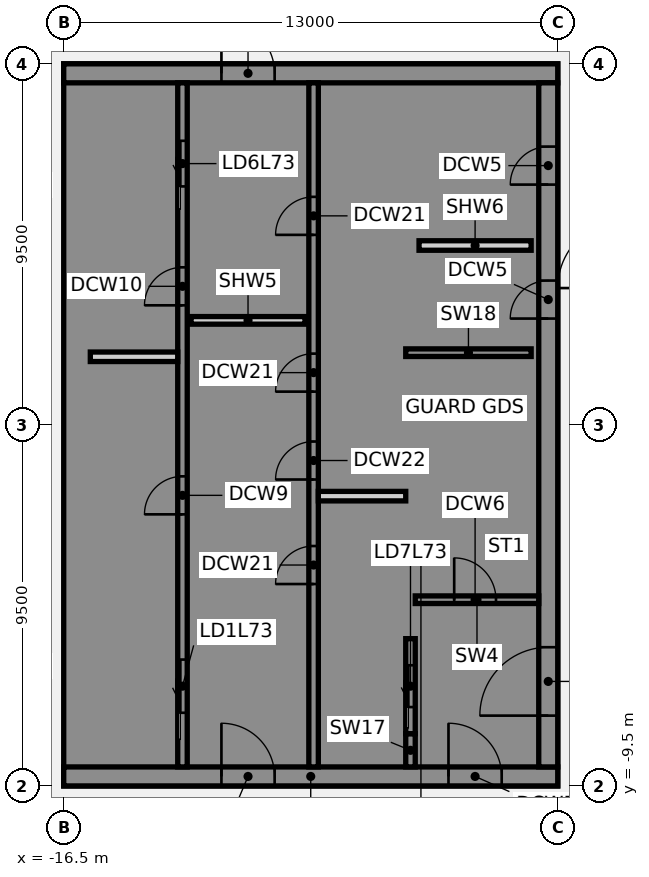
"""IFC4 building model, lengths in metres.
Left out: names, types, materials, properties, quantities, classifications, styles, units other than length and angle.
Written with IfcOpenShell. Run it as: python <this file> out.ifc"""

import sys

from ifc_helpers import new_model, si_unit, direction, frame, frame_2d, origin, place, context, subcontext, project, spatial, polyline, rectangle, outline, extrude, element, fill, save


model = new_model("IFC4")
c1 = context("Model", 3, precision=1e-05, world=origin(), true_north=direction((0.0, 1.0)))
c2 = subcontext(c1, "Body", "Model", "MODEL_VIEW")
j1 = project(units=[si_unit("LENGTHUNIT", "METRE"), si_unit("PLANEANGLEUNIT", "RADIAN")], contexts=[c1])
p1 = place(None, origin())
s1 = spatial("IfcSite", under=j1, at=p1, CompositionType="ELEMENT")
p2 = place(p1, origin())
s2 = spatial("IfcBuilding", under=s1, at=p2, CompositionType="ELEMENT")
p3 = place(p2, frame((0.0, 0.0, 294.4)))
s3 = spatial("IfcBuildingStorey", under=s2, at=p3, CompositionType="ELEMENT", Elevation=294.4)
p4 = place(p3, frame((-16.5, -9.25, 0.0), z_axis=(0.0, 0.0, 1.0), x_axis=(1.0, 0.0, 0.0)))
e1 = element("IfcWall", 1, at=p4, inside=s3, PredefinedType="SHEAR", context=c2, shape_type="SweptSolid", body=[
    extrude(rectangle(XDim=13.0, YDim=0.5, at=frame_2d((6.5, 0.0))), origin(), (0.0, 0.0, 1.0), 4.75),
])
p5 = place(p4, frame((4.15, 0.0, 0.0)))
e2 = element("IfcOpeningElement", 2, at=p5, cuts=e1, PredefinedType="OPENING", context=c2, shape_type="SweptSolid", body=[
    extrude(rectangle(XDim=1.4, YDim=2.1, at=frame_2d((0.7, 1.05))), frame((0.0, 0.26, 0.0), z_axis=(0.0, -1.0, 0.0), x_axis=(1.0, 0.0, 0.0)), (0.0, 0.0, 1.0), 0.52),
])
p6 = place(p4, frame((10.125, 0.0, 0.0)))
e3 = element("IfcOpeningElement", 3, at=p6, cuts=e1, PredefinedType="OPENING", context=c2, shape_type="SweptSolid", body=[
    extrude(rectangle(XDim=1.4, YDim=2.1, at=frame_2d((0.7, 1.05))), frame((0.0, 0.26, 0.0), z_axis=(0.0, -1.0, 0.0), x_axis=(1.0, 0.0, 0.0)), (0.0, 0.0, 1.0), 0.52),
])
p7 = place(p3, frame((-16.5, 9.25, 0.0), z_axis=(0.0, 0.0, 1.0), x_axis=(1.0, 0.0, 0.0)))
e4 = element("IfcWall", 4, at=p7, inside=s3, PredefinedType="SHEAR", context=c2, shape_type="SweptSolid", body=[
    extrude(rectangle(XDim=13.0, YDim=0.5, at=frame_2d((6.5, 0.0))), origin(), (0.0, 0.0, 1.0), 4.75),
])
p8 = place(p7, frame((4.15, 0.0, 0.0)))
e5 = element("IfcOpeningElement", 5, at=p8, cuts=e4, PredefinedType="OPENING", context=c2, shape_type="SweptSolid", body=[
    extrude(rectangle(XDim=1.4, YDim=2.1, at=frame_2d((0.7, 1.05))), frame((0.0, 0.26, 0.0), z_axis=(0.0, -1.0, 0.0), x_axis=(1.0, 0.0, 0.0)), (0.0, 0.0, 1.0), 0.52),
])
p9 = place(p3, frame((-13.15, 2.75, 0.0), z_axis=(0.0, 0.0, 1.0), x_axis=(1.0, 0.0, 0.0)))
e6 = element("IfcWall", 6, at=p9, inside=s3, PredefinedType="PARTITIONING", context=c2, shape_type="SweptSolid", body=[
    extrude(rectangle(XDim=3.0, YDim=0.2, at=frame_2d((1.5, 0.0))), origin(), (0.0, 0.0, 1.0), 4.75),
])
p10 = place(p3, origin())
e7 = element("IfcWall", 7, at=p10, inside=s3, PredefinedType="SHEAR", context=c2, shape_type="SweptSolid", body=[
    extrude(outline(polyline([(-13.5, -8.125), (-16.0, -8.125), (-16.0, -5.625), (-13.5, -5.625), (-13.5, -5.375), (-16.0, -5.375), (-16.0, 5.375), (-13.5, 5.375), (-13.5, 5.625), (-16.0, 5.625), (-16.0, 8.125), (-13.5, 8.125), (-13.5, 9.0), (-16.0, 9.0), (-16.5, 9.0), (-16.5, -9.0), (-16.0, -9.0), (-13.5, -9.0), (-13.5, -8.125)])), origin(), (0.0, 0.0, 1.0), 4.75),
])
p11 = place(p3, origin())
e8 = element("IfcWall", 8, at=p11, inside=s3, PredefinedType="SHEAR", context=c2, shape_type="SweptSolid", body=[
    extrude(outline(polyline([(-9.8, -5.625), (-7.5, -5.625), (-7.25, -5.625), (-7.25, 9.0), (-7.5, 9.0), (-9.8, 9.0), (-9.8, 8.125), (-7.5, 8.125), (-7.5, -5.375), (-9.8, -5.375), (-9.8, -5.625)])), origin(), (0.0, 0.0, 1.0), 4.75),
])
p12 = place(p3, origin())
e9 = element("IfcWall", 9, at=p12, inside=s3, PredefinedType="SHEAR", context=c2, shape_type="SweptSolid", body=[
    extrude(outline(polyline([(-7.5, -8.125), (-9.55, -8.125), (-9.55, -5.625), (-9.8, -5.625), (-9.8, -8.125), (-9.8, -9.0), (-7.5, -9.0), (-7.5, -8.125)])), origin(), (0.0, 0.0, 1.0), 4.75),
])
p13 = place(p3, frame((-7.375, -9.0, 0.0), z_axis=(0.0, 0.0, 1.0), x_axis=(0.0, 1.0, 0.0)))
e10 = element("IfcWall", 10, at=p13, inside=s3, PredefinedType="SHEAR", context=c2, shape_type="SweptSolid", body=[
    extrude(rectangle(XDim=0.875, YDim=0.25, at=frame_2d((0.438, 0.0))), origin(), (0.0, 0.0, 1.0), 4.75),
])
p14 = place(p3, frame((-7.5, 1.9, 0.0), z_axis=(0.0, 0.0, 1.0), x_axis=(1.0, 0.0, 0.0)))
e11 = element("IfcWall", 11, at=p14, inside=s3, PredefinedType="SHEAR", context=c2, shape_type="SweptSolid", body=[
    extrude(rectangle(XDim=3.3, YDim=0.2, at=frame_2d((1.65, 0.0))), origin(), (0.0, 0.0, 1.0), 4.75),
])
p15 = place(p3, frame((-13.375, -9.0, 0.0), z_axis=(0.0, 0.0, 1.0), x_axis=(0.0, 1.0, 0.0)))
e12 = element("IfcWall", 12, at=p15, inside=s3, PredefinedType="SHEAR", context=c2, shape_type="SweptSolid", body=[
    extrude(rectangle(XDim=18.0, YDim=0.25, at=frame_2d((9.0, 0.0))), origin(), (0.0, 0.0, 1.0), 4.75),
])
p16 = place(p15, frame((1.425, 0.0, 0.0)))
e13 = element("IfcOpeningElement", 13, at=p16, cuts=e12, PredefinedType="OPENING", context=c2, shape_type="SweptSolid", body=[
    extrude(rectangle(XDim=1.4, YDim=2.1, at=frame_2d((0.7, 1.05))), frame((0.0, 0.135, 0.0), z_axis=(0.0, -1.0, 0.0), x_axis=(1.0, 0.0, 0.0)), (0.0, 0.0, 1.0), 0.27),
])
p17 = place(p15, frame((15.275, 0.0, 0.0)))
e14 = element("IfcOpeningElement", 14, at=p17, cuts=e12, PredefinedType="OPENING", context=c2, shape_type="SweptSolid", body=[
    extrude(rectangle(XDim=1.2, YDim=2.1, at=frame_2d((0.6, 1.05))), frame((0.0, 0.135, 0.0), z_axis=(0.0, -1.0, 0.0), x_axis=(1.0, 0.0, 0.0)), (0.0, 0.0, 1.0), 0.27),
])
p18 = place(p15, frame((6.646, 0.0, 0.0)))
e15 = element("IfcOpeningElement", 15, at=p18, cuts=e12, PredefinedType="OPENING", context=c2, shape_type="SweptSolid", body=[
    extrude(rectangle(XDim=1.0, YDim=2.1, at=frame_2d((0.5, 1.05))), frame((0.0, 0.135, 0.0), z_axis=(0.0, -1.0, 0.0), x_axis=(1.0, 0.0, 0.0)), (0.0, 0.0, 1.0), 0.27),
])
p19 = place(p15, frame((12.146, 0.0, 0.0)))
e16 = element("IfcOpeningElement", 16, at=p19, cuts=e12, PredefinedType="OPENING", context=c2, shape_type="SweptSolid", body=[
    extrude(rectangle(XDim=1.0, YDim=2.1, at=frame_2d((0.5, 1.05))), frame((0.0, 0.135, 0.0), z_axis=(0.0, -1.0, 0.0), x_axis=(1.0, 0.0, 0.0)), (0.0, 0.0, 1.0), 0.27),
])
p20 = place(p3, frame((-9.925, -9.0, 0.0), z_axis=(0.0, 0.0, 1.0), x_axis=(0.0, 1.0, 0.0)))
e17 = element("IfcWall", 17, at=p20, inside=s3, PredefinedType="SHEAR", context=c2, shape_type="SweptSolid", body=[
    extrude(rectangle(XDim=18.0, YDim=0.25, at=frame_2d((9.0, 0.0))), origin(), (0.0, 0.0, 1.0), 4.75),
])
p21 = place(p20, frame((4.812, 0.0, 0.0)))
e18 = element("IfcOpeningElement", 18, at=p21, cuts=e17, PredefinedType="OPENING", context=c2, shape_type="SweptSolid", body=[
    extrude(rectangle(XDim=1.0, YDim=2.1, at=frame_2d((0.5, 1.05))), frame((0.0, 0.135, 0.0), z_axis=(0.0, -1.0, 0.0), x_axis=(1.0, 0.0, 0.0)), (0.0, 0.0, 1.0), 0.27),
])
p22 = place(p20, frame((7.562, 0.0, 0.0)))
e19 = element("IfcOpeningElement", 19, at=p22, cuts=e17, PredefinedType="OPENING", context=c2, shape_type="SweptSolid", body=[
    extrude(rectangle(XDim=1.0, YDim=2.1, at=frame_2d((0.5, 1.05))), frame((0.0, 0.135, 0.0), z_axis=(0.0, -1.0, 0.0), x_axis=(1.0, 0.0, 0.0)), (0.0, 0.0, 1.0), 0.27),
])
p23 = place(p20, frame((9.875, 0.0, 0.0)))
e20 = element("IfcOpeningElement", 20, at=p23, cuts=e17, PredefinedType="OPENING", context=c2, shape_type="SweptSolid", body=[
    extrude(rectangle(XDim=1.0, YDim=2.1, at=frame_2d((0.5, 1.05))), frame((0.0, 0.135, 0.0), z_axis=(0.0, -1.0, 0.0), x_axis=(1.0, 0.0, 0.0)), (0.0, 0.0, 1.0), 0.27),
])
p24 = place(p20, frame((14.0, 0.0, 0.0)))
e21 = element("IfcOpeningElement", 21, at=p24, cuts=e17, PredefinedType="OPENING", context=c2, shape_type="SweptSolid", body=[
    extrude(rectangle(XDim=1.0, YDim=2.1, at=frame_2d((0.5, 1.05))), frame((0.0, 0.135, 0.0), z_axis=(0.0, -1.0, 0.0), x_axis=(1.0, 0.0, 0.0)), (0.0, 0.0, 1.0), 0.27),
])
p25 = place(p3, frame((-7.375, -8.125, 0.0), z_axis=(0.0, 0.0, 1.0), x_axis=(0.0, 1.0, 0.0)))
e22 = element("IfcWall", 22, at=p25, inside=s3, PredefinedType="SHEAR", context=c2, shape_type="SweptSolid", body=[
    extrude(rectangle(XDim=2.5, YDim=0.25, at=frame_2d((1.25, 0.0))), origin(), (0.0, 0.0, 1.0), 4.75),
])
p26 = place(p25, frame((0.7, 0.0, 0.0)))
e23 = element("IfcOpeningElement", 23, at=p26, cuts=e22, PredefinedType="OPENING", context=c2, shape_type="SweptSolid", body=[
    extrude(rectangle(XDim=1.1, YDim=2.1, at=frame_2d((0.55, 1.05))), frame((0.0, 0.135, 0.0), z_axis=(0.0, -1.0, 0.0), x_axis=(1.0, 0.0, 0.0)), (0.0, 0.0, 1.0), 0.27),
])
p27 = place(p3, frame((-3.75, -9.0, 0.0), z_axis=(0.0, 0.0, 1.0), x_axis=(0.0, 1.0, 0.0)))
e24 = element("IfcWall", 24, at=p27, inside=s3, PredefinedType="SHEAR", context=c2, shape_type="SweptSolid", body=[
    extrude(rectangle(XDim=18.0, YDim=0.5, at=frame_2d((9.0, 0.0))), origin(), (0.0, 0.0, 1.0), 4.75),
])
p28 = place(p27, frame((1.35, 0.0, 0.0)))
e25 = element("IfcOpeningElement", 25, at=p28, cuts=e24, PredefinedType="OPENING", context=c2, shape_type="SweptSolid", body=[
    extrude(rectangle(XDim=1.8, YDim=2.1, at=frame_2d((0.9, 1.05))), frame((0.0, 0.26, 0.0), z_axis=(0.0, -1.0, 0.0), x_axis=(1.0, 0.0, 0.0)), (0.0, 0.0, 1.0), 0.52),
])
p29 = place(p27, frame((11.798, 0.0, 0.0)))
e26 = element("IfcOpeningElement", 26, at=p29, cuts=e24, PredefinedType="OPENING", context=c2, shape_type="SweptSolid", body=[
    extrude(rectangle(XDim=1.0, YDim=2.1, at=frame_2d((0.5, 1.05))), frame((0.0, 0.26, 0.0), z_axis=(0.0, -1.0, 0.0), x_axis=(1.0, 0.0, 0.0)), (0.0, 0.0, 1.0), 0.52),
])
p30 = place(p27, frame((15.323, 0.0, 0.0)))
e27 = element("IfcOpeningElement", 27, at=p30, cuts=e24, PredefinedType="OPENING", context=c2, shape_type="SweptSolid", body=[
    extrude(rectangle(XDim=1.0, YDim=2.1, at=frame_2d((0.5, 1.05))), frame((0.0, 0.26, 0.0), z_axis=(0.0, -1.0, 0.0), x_axis=(1.0, 0.0, 0.0)), (0.0, 0.0, 1.0), 0.52),
])
p31 = place(p3, frame((-7.15, 4.72, 0.0), z_axis=(0.0, 0.0, 1.0), x_axis=(1.0, 0.0, 0.0)))
e28 = element("IfcWall", 28, at=p31, inside=s3, PredefinedType="PARTITIONING", context=c2, shape_type="SweptSolid", body=[
    extrude(rectangle(XDim=2.95, YDim=0.25, at=frame_2d((1.475, 0.0))), origin(), (0.0, 0.0, 1.0), 4.75),
])
p32 = place(p3, frame((-7.25, -4.6, 0.0), z_axis=(0.0, 0.0, 1.0), x_axis=(1.0, 0.0, 0.0)))
e29 = element("IfcWall", 29, at=p32, inside=s3, PredefinedType="SHEAR", context=c2, shape_type="SweptSolid", body=[
    extrude(rectangle(XDim=3.25, YDim=0.2, at=frame_2d((1.625, 0.0))), origin(), (0.0, 0.0, 1.0), 4.75),
])
p33 = place(p32, frame((1.025, 0.0, 0.0)))
e30 = element("IfcOpeningElement", 30, at=p33, cuts=e29, PredefinedType="OPENING", context=c2, shape_type="SweptSolid", body=[
    extrude(rectangle(XDim=1.1, YDim=2.1, at=frame_2d((0.55, 1.05))), frame((0.0, 0.11, 0.0), z_axis=(0.0, -1.0, 0.0), x_axis=(1.0, 0.0, 0.0)), (0.0, 0.0, 1.0), 0.22),
])
for number, where, z_axis, x_axis in (
    (31, (-15.8, 1.792, 0.0), (0.0, 0.0, 1.0), (1.0, 0.0, 0.0)),
    (32, (-9.8, -1.875, 0.0), (0.0, 0.0, 1.0), (1.0, 0.0, 0.0)),
):
    element("IfcWall", number, at=place(p3, frame(where, z_axis=z_axis, x_axis=x_axis)), inside=s3, PredefinedType="PARTITIONING", context=c2, shape_type="SweptSolid", body=[
        extrude(rectangle(XDim=2.3, YDim=0.25, at=frame_2d((1.15, 0.0))), origin(), (0.0, 0.0, 1.0), 4.75),
    ])
p34 = place(p5, origin())
e33 = element("IfcDoor", 33, at=p34, inside=s3, OperationType="SINGLE_SWING_LEFT", PredefinedType="DOOR", context=c2, shape_type="SweptSolid", body=[
    extrude(rectangle(XDim=1.4, YDim=2.1, at=frame_2d((0.7, 1.05))), frame((0.0, 0.025, 0.0), z_axis=(0.0, -1.0, 0.0), x_axis=(1.0, 0.0, 0.0)), (0.0, 0.0, 1.0), 0.05),
])
fill(e2, e33)
p35 = place(p6, origin())
e34 = element("IfcDoor", 34, at=p35, inside=s3, OperationType="SINGLE_SWING_LEFT", PredefinedType="DOOR", context=c2, shape_type="SweptSolid", body=[
    extrude(rectangle(XDim=1.4, YDim=2.1, at=frame_2d((0.7, 1.05))), frame((0.0, 0.025, 0.0), z_axis=(0.0, -1.0, 0.0), x_axis=(1.0, 0.0, 0.0)), (0.0, 0.0, 1.0), 0.05),
])
fill(e3, e34)
p36 = place(p8, origin())
e35 = element("IfcDoor", 35, at=p36, inside=s3, OperationType="SINGLE_SWING_LEFT", PredefinedType="DOOR", context=c2, shape_type="SweptSolid", body=[
    extrude(rectangle(XDim=1.4, YDim=2.1, at=frame_2d((0.7, 1.05))), frame((0.0, 0.025, 0.0), z_axis=(0.0, -1.0, 0.0), x_axis=(1.0, 0.0, 0.0)), (0.0, 0.0, 1.0), 0.05),
])
fill(e5, e35)
p37 = place(p28, origin())
e36 = element("IfcDoor", 36, at=p37, inside=s3, OperationType="SINGLE_SWING_LEFT", PredefinedType="DOOR", context=c2, shape_type="SweptSolid", body=[
    extrude(rectangle(XDim=1.8, YDim=2.1, at=frame_2d((0.9, 1.05))), frame((0.0, 0.025, 0.0), z_axis=(0.0, -1.0, 0.0), x_axis=(1.0, 0.0, 0.0)), (0.0, 0.0, 1.0), 0.05),
])
fill(e25, e36)
p38 = place(p29, origin())
e37 = element("IfcDoor", 37, at=p38, inside=s3, OperationType="SINGLE_SWING_LEFT", PredefinedType="DOOR", context=c2, shape_type="SweptSolid", body=[
    extrude(rectangle(XDim=1.0, YDim=2.1, at=frame_2d((0.5, 1.05))), frame((0.0, 0.225, 0.0), z_axis=(0.0, -1.0, 0.0), x_axis=(1.0, 0.0, 0.0)), (0.0, 0.0, 1.0), 0.05),
])
fill(e26, e37)
p39 = place(p30, origin())
e38 = element("IfcDoor", 38, at=p39, inside=s3, OperationType="SINGLE_SWING_LEFT", PredefinedType="DOOR", context=c2, shape_type="SweptSolid", body=[
    extrude(rectangle(XDim=1.0, YDim=2.1, at=frame_2d((0.5, 1.05))), frame((0.0, 0.225, 0.0), z_axis=(0.0, -1.0, 0.0), x_axis=(1.0, 0.0, 0.0)), (0.0, 0.0, 1.0), 0.05),
])
fill(e27, e38)
p40 = place(p33, origin())
e39 = element("IfcDoor", 39, at=p40, inside=s3, OperationType="SINGLE_SWING_LEFT", PredefinedType="DOOR", context=c2, shape_type="SweptSolid", body=[
    extrude(rectangle(XDim=1.1, YDim=2.1, at=frame_2d((0.55, 1.05))), frame((0.0, 0.025, 0.0), z_axis=(0.0, -1.0, 0.0), x_axis=(1.0, 0.0, 0.0)), (0.0, 0.0, 1.0), 0.05),
])
fill(e30, e39)
p41 = place(p16, origin())
e40 = element("IfcDoor", 40, at=p41, inside=s3, OperationType="SLIDING_TO_LEFT", PredefinedType="DOOR", context=c2, shape_type="SweptSolid", body=[
    extrude(rectangle(XDim=1.4, YDim=2.1, at=frame_2d((0.7, 1.05))), frame((0.0, 0.025, 0.0), z_axis=(0.0, -1.0, 0.0), x_axis=(1.0, 0.0, 0.0)), (0.0, 0.0, 1.0), 0.05),
])
fill(e13, e40)
p42 = place(p17, origin())
e41 = element("IfcDoor", 41, at=p42, inside=s3, OperationType="SLIDING_TO_LEFT", PredefinedType="DOOR", context=c2, shape_type="SweptSolid", body=[
    extrude(rectangle(XDim=1.2, YDim=2.1, at=frame_2d((0.6, 1.05))), frame((0.0, 0.025, 0.0), z_axis=(0.0, -1.0, 0.0), x_axis=(1.0, 0.0, 0.0)), (0.0, 0.0, 1.0), 0.05),
])
fill(e14, e41)
p43 = place(p26, origin())
e42 = element("IfcDoor", 42, at=p43, inside=s3, OperationType="SLIDING_TO_LEFT", PredefinedType="DOOR", context=c2, shape_type="SweptSolid", body=[
    extrude(rectangle(XDim=1.1, YDim=2.1, at=frame_2d((0.55, 1.05))), frame((0.0, 0.025, 0.0), z_axis=(0.0, -1.0, 0.0), x_axis=(1.0, 0.0, 0.0)), (0.0, 0.0, 1.0), 0.05),
])
fill(e23, e42)
p44 = place(p18, origin())
e43 = element("IfcDoor", 43, at=p44, inside=s3, OperationType="SINGLE_SWING_LEFT", PredefinedType="DOOR", context=c2, shape_type="SweptSolid", body=[
    extrude(rectangle(XDim=1.0, YDim=2.1, at=frame_2d((0.5, 1.05))), frame((0.0, 0.025, 0.0), z_axis=(0.0, -1.0, 0.0), x_axis=(1.0, 0.0, 0.0)), (0.0, 0.0, 1.0), 0.05),
])
fill(e15, e43)
p45 = place(p19, origin())
e44 = element("IfcDoor", 44, at=p45, inside=s3, OperationType="SINGLE_SWING_LEFT", PredefinedType="DOOR", context=c2, shape_type="SweptSolid", body=[
    extrude(rectangle(XDim=1.0, YDim=2.1, at=frame_2d((0.5, 1.05))), frame((0.0, 0.025, 0.0), z_axis=(0.0, -1.0, 0.0), x_axis=(1.0, 0.0, 0.0)), (0.0, 0.0, 1.0), 0.05),
])
fill(e16, e44)
p46 = place(p21, origin())
e45 = element("IfcDoor", 45, at=p46, inside=s3, OperationType="SINGLE_SWING_LEFT", PredefinedType="DOOR", context=c2, shape_type="SweptSolid", body=[
    extrude(rectangle(XDim=1.0, YDim=2.1, at=frame_2d((0.5, 1.05))), frame((0.0, 0.025, 0.0), z_axis=(0.0, -1.0, 0.0), x_axis=(1.0, 0.0, 0.0)), (0.0, 0.0, 1.0), 0.05),
])
fill(e18, e45)
p47 = place(p22, origin())
e46 = element("IfcDoor", 46, at=p47, inside=s3, OperationType="SINGLE_SWING_LEFT", PredefinedType="DOOR", context=c2, shape_type="SweptSolid", body=[
    extrude(rectangle(XDim=1.0, YDim=2.1, at=frame_2d((0.5, 1.05))), frame((0.0, 0.025, 0.0), z_axis=(0.0, -1.0, 0.0), x_axis=(1.0, 0.0, 0.0)), (0.0, 0.0, 1.0), 0.05),
])
fill(e19, e46)
p48 = place(p23, origin())
e47 = element("IfcDoor", 47, at=p48, inside=s3, OperationType="SINGLE_SWING_LEFT", PredefinedType="DOOR", context=c2, shape_type="SweptSolid", body=[
    extrude(rectangle(XDim=1.0, YDim=2.1, at=frame_2d((0.5, 1.05))), frame((0.0, 0.025, 0.0), z_axis=(0.0, -1.0, 0.0), x_axis=(1.0, 0.0, 0.0)), (0.0, 0.0, 1.0), 0.05),
])
fill(e20, e47)
p49 = place(p24, origin())
e48 = element("IfcDoor", 48, at=p49, inside=s3, OperationType="SINGLE_SWING_LEFT", PredefinedType="DOOR", context=c2, shape_type="SweptSolid", body=[
    extrude(rectangle(XDim=1.0, YDim=2.1, at=frame_2d((0.5, 1.05))), frame((0.0, 0.025, 0.0), z_axis=(0.0, -1.0, 0.0), x_axis=(1.0, 0.0, 0.0)), (0.0, 0.0, 1.0), 0.05),
])
fill(e21, e48)
save(model, sys.argv[1])
